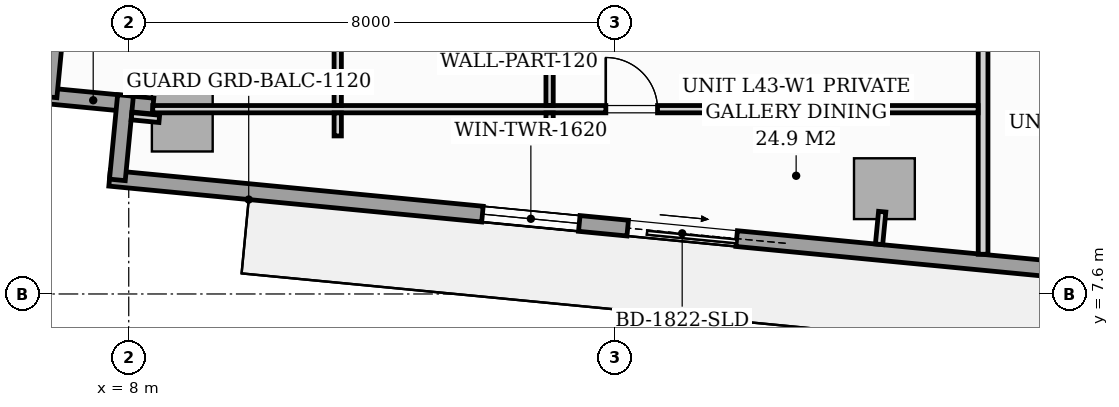
"""IFC4 building model, lengths in metres.
Left out: names, types, materials, properties, quantities, classifications, styles, units other than length and angle.
Written with IfcOpenShell. Run it as: python <this file> out.ifc"""

import sys

from ifc_helpers import new_model, si_unit, direction, frame, frame_2d, origin, origin_2d, place, context, subcontext, project, spatial, rectangle, extrude, source, transform, mapped, element, fill, save


model = new_model("IFC4")
c1 = context("Model", 3, precision=1e-05, world=origin(), true_north=direction((0.0, 1.0)))
c2 = subcontext(c1, "Body", "Model", "MODEL_VIEW")
j1 = project(units=[si_unit("LENGTHUNIT", "METRE"), si_unit("PLANEANGLEUNIT", "RADIAN")], contexts=[c1])
p1 = place(None, origin())
s1 = spatial("IfcSite", under=j1, at=p1, CompositionType="ELEMENT")
p2 = place(p1, origin())
s2 = spatial("IfcBuilding", under=s1, at=p2, CompositionType="ELEMENT")
p3 = place(p2, frame((0.0, 0.0, 150.2)))
s3 = spatial("IfcBuildingStorey", under=s2, at=p3, CompositionType="ELEMENT", Elevation=150.2)
m1 = source(origin(), c2, "Body", "SweptSolid", [
    extrude(rectangle(XDim=1.0, YDim=1.0, at=origin_2d()), origin(), (0.0, 0.0, 1.0), 3.196),
])
for number, where, z_axis, x_axis in (
    (1, (8.881, 10.443, 0.002), (0.0, 0.0, 1.0), (0.995, -0.096, 0.0)),
    (2, (20.427, 9.332, 0.002), (0.0, 0.0, 1.0), (0.995, -0.096, 0.0)),
):
    element("IfcColumn", number, at=place(p3, frame(where, z_axis=z_axis, x_axis=x_axis)), inside=s3, PredefinedType="COLUMN", context=c2, shape_type="MappedRepresentation", body=[
        mapped(m1, transform((0.0, 0.0, 0.0), scale=1.0)),
    ])
p4 = place(p3, frame((8.4, 10.69, 0.0), z_axis=(0.0, 0.0, 1.0), x_axis=(-0.995391147587, 0.095898192396, 0.0)))
e3 = element("IfcWall", 3, at=p4, inside=s3, PredefinedType="STANDARD", context=c2, shape_type="SweptSolid", body=[
    extrude(rectangle(XDim=1.978, YDim=0.26, at=frame_2d((0.989, 0.0))), origin(), (0.0, 0.0, 1.0), 2.94),
])
p5 = place(p3, frame((6.688, 10.84, 0.0), z_axis=(0.0, 0.0, 1.0), x_axis=(0.09589913835, 0.995391056452, 0.0)))
e4 = element("IfcWall", 4, at=p5, inside=s3, PredefinedType="STANDARD", context=c2, shape_type="SweptSolid", body=[
    extrude(rectangle(XDim=1.395, YDim=0.26, at=frame_2d((0.698, 0.0))), origin(), (0.0, 0.0, 1.0), 2.94),
])
p6 = place(p3, frame((24.617, 7.873, 0.0), z_axis=(0.0, 0.0, 1.0), x_axis=(-0.995395976631, 0.095848055311, 0.0)))
e5 = element("IfcWall", 5, at=p6, inside=s3, PredefinedType="STANDARD", context=c2, shape_type="SweptSolid", body=[
    extrude(rectangle(XDim=17.01, YDim=0.26, at=frame_2d((8.505, 0.0))), origin(), (0.0, 0.0, 1.0), 2.94),
])
p7 = place(p6, frame((6.65, 0.0, 0.0)))
e6 = element("IfcOpeningElement", 6, at=p7, cuts=e5, PredefinedType="OPENING", context=c2, shape_type="SweptSolid", body=[
    extrude(rectangle(XDim=1.8, YDim=2.06, at=frame_2d((0.9, 1.03))), frame((0.0, 0.14, 0.0), z_axis=(0.0, -1.0, 0.0), x_axis=(1.0, 0.0, 0.0)), (0.0, 0.0, 1.0), 0.28),
])
p8 = place(p6, frame((9.25, 0.0, 0.65)))
e7 = element("IfcOpeningElement", 7, at=p8, cuts=e5, PredefinedType="OPENING", context=c2, shape_type="SweptSolid", body=[
    extrude(rectangle(XDim=1.6, YDim=1.5, at=frame_2d((0.8, 0.75))), frame((0.0, 0.14, 0.0), z_axis=(0.0, -1.0, 0.0), x_axis=(1.0, 0.0, 0.0)), (0.0, 0.0, 1.0), 0.28),
])
p9 = place(p3, frame((7.813, 9.476, 0.0), z_axis=(0.0, 0.0, 1.0), x_axis=(0.095915846097, 0.995389446633, 0.0)))
e8 = element("IfcWall", 8, at=p9, inside=s3, PredefinedType="STANDARD", context=c2, shape_type="SweptSolid", body=[
    extrude(rectangle(XDim=1.395, YDim=0.26, at=frame_2d((0.697, 0.0))), origin(), (0.0, 0.0, 1.0), 2.94),
])
p10 = place(p3, frame((22.05, 8.253, 0.0), z_axis=(0.0, 0.0, 1.0), x_axis=(0.0, 1.0, 0.0)))
e9 = element("IfcWall", 9, at=p10, inside=s3, PredefinedType="PARTITIONING", context=c2, shape_type="SweptSolid", body=[
    extrude(rectangle(XDim=4.215, YDim=0.16, at=frame_2d((2.107, 0.0))), origin(), (0.0, 0.0, 1.0), 2.94),
])
p11 = place(p3, frame((8.395, 10.639, 0.0), z_axis=(0.0, 0.0, 1.0), x_axis=(1.0, 0.0, 0.0)))
e10 = element("IfcWall", 10, at=p11, inside=s3, PredefinedType="PARTITIONING", context=c2, shape_type="SweptSolid", body=[
    extrude(rectangle(XDim=13.573, YDim=0.12, at=frame_2d((6.787, 0.0))), origin(), (0.0, 0.0, 1.0), 2.94),
])
p12 = place(p11, frame((7.451, 0.0, 0.0)))
e11 = element("IfcOpeningElement", 11, at=p12, cuts=e10, PredefinedType="OPENING", context=c2, shape_type="SweptSolid", body=[
    extrude(rectangle(XDim=0.85, YDim=2.05, at=frame_2d((0.425, 1.025))), frame((0.0, 0.07, 0.0), z_axis=(0.0, -1.0, 0.0), x_axis=(1.0, 0.0, 0.0)), (0.0, 0.0, 1.0), 0.14),
])
p13 = place(p3, frame((11.437, 10.199, 0.0), z_axis=(0.0, 0.0, 1.0), x_axis=(0.0, 1.0, 0.0)))
e12 = element("IfcWall", 12, at=p13, inside=s3, PredefinedType="PARTITIONING", context=c2, shape_type="SweptSolid", body=[
    extrude(rectangle(XDim=0.378, YDim=0.12, at=frame_2d((0.189, 0.0))), origin(), (0.0, 0.0, 1.0), 2.94),
])
p14 = place(p3, frame((11.437, 10.701, 0.0), z_axis=(0.0, 0.0, 1.0), x_axis=(0.0, 1.0, 0.0)))
e13 = element("IfcWall", 13, at=p14, inside=s3, PredefinedType="PARTITIONING", context=c2, shape_type="SweptSolid", body=[
    extrude(rectangle(XDim=10.601, YDim=0.12, at=frame_2d((5.301, 0.0))), origin(), (0.0, 0.0, 1.0), 2.94),
])
p15 = place(p14, frame((4.876, 0.0, 0.0)))
e14 = element("IfcOpeningElement", 14, at=p15, cuts=e13, PredefinedType="OPENING", context=c2, shape_type="SweptSolid", body=[
    extrude(rectangle(XDim=0.85, YDim=2.05, at=frame_2d((0.425, 1.025))), frame((0.0, 0.07, 0.0), z_axis=(0.0, -1.0, 0.0), x_axis=(1.0, 0.0, 0.0)), (0.0, 0.0, 1.0), 0.14),
])
p16 = place(p3, frame((14.921, 10.199, 0.0), z_axis=(0.0, 0.0, 1.0), x_axis=(0.0, 1.0, 0.0)))
e15 = element("IfcWall", 15, at=p16, inside=s3, PredefinedType="PARTITIONING", context=c2, shape_type="SweptSolid", body=[
    extrude(rectangle(XDim=0.378, YDim=0.12, at=frame_2d((0.189, 0.0))), origin(), (0.0, 0.0, 1.0), 2.94),
])
p17 = place(p3, frame((14.921, 10.701, 0.0), z_axis=(0.0, 0.0, 1.0), x_axis=(0.0, 1.0, 0.0)))
e16 = element("IfcWall", 16, at=p17, inside=s3, PredefinedType="PARTITIONING", context=c2, shape_type="SweptSolid", body=[
    extrude(rectangle(XDim=10.601, YDim=0.12, at=frame_2d((5.301, 0.0))), origin(), (0.0, 0.0, 1.0), 2.94),
])
p18 = place(p17, frame((4.876, 0.0, 0.0)))
e17 = element("IfcOpeningElement", 17, at=p18, cuts=e16, PredefinedType="OPENING", context=c2, shape_type="SweptSolid", body=[
    extrude(rectangle(XDim=0.85, YDim=2.05, at=frame_2d((0.425, 1.025))), frame((0.0, 0.07, 0.0), z_axis=(0.0, -1.0, 0.0), x_axis=(1.0, 0.0, 0.0)), (0.0, 0.0, 1.0), 0.14),
])
p19 = place(p3, frame((8.502, 10.48, 0.0), z_axis=(0.0, 0.0, 1.0), x_axis=(-0.995384576284, 0.09596637586, 0.0)))
e18 = element("IfcWall", 18, at=p19, inside=s3, PredefinedType="PARTITIONING", context=c2, shape_type="SweptSolid", body=[
    extrude(rectangle(XDim=0.458, YDim=0.12, at=frame_2d((0.229, 0.0))), origin(), (0.0, 0.0, 1.0), 2.94),
])
p20 = place(p3, frame((20.391, 8.953, 0.0), z_axis=(0.0, 0.0, 1.0), x_axis=(-0.096222656154, -0.995359834654, 0.0)))
e19 = element("IfcWall", 19, at=p20, inside=s3, PredefinedType="PARTITIONING", context=c2, shape_type="SweptSolid", body=[
    extrude(rectangle(XDim=0.538, YDim=0.12, at=frame_2d((0.269, 0.0))), origin(), (0.0, 0.0, 1.0), 2.94),
])
m2 = source(origin(), c2, "Body", "SweptSolid", [
    extrude(rectangle(XDim=1.8, YDim=2.06, at=frame_2d((0.9, 1.03))), frame((0.0, 0.025, 0.0), z_axis=(0.0, -1.0, 0.0), x_axis=(1.0, 0.0, 0.0)), (0.0, 0.0, 1.0), 0.05),
])
p21 = place(p7, origin())
e20 = element("IfcDoor", 20, at=p21, inside=s3, OperationType="SLIDING_TO_LEFT", PredefinedType="DOOR", context=c2, shape_type="MappedRepresentation", body=[
    mapped(m2, transform((0.0, 0.0, 0.0), scale=1.0)),
])
fill(e6, e20)
m3 = source(origin(), c2, "Body", "SweptSolid", [
    extrude(rectangle(XDim=1.6, YDim=1.5, at=frame_2d((0.8, 0.75))), frame((0.0, 0.03, 0.0), z_axis=(0.0, -1.0, 0.0), x_axis=(1.0, 0.0, 0.0)), (0.0, 0.0, 1.0), 0.06),
])
p22 = place(p8, origin())
e21 = element("IfcWindow", 21, at=p22, inside=s3, PartitioningType="SINGLE_PANEL", PredefinedType="WINDOW", context=c2, shape_type="MappedRepresentation", body=[
    mapped(m3, transform((0.0, 0.0, 0.0), scale=1.0)),
])
fill(e7, e21)
m4 = source(origin(), c2, "Body", "SweptSolid", [
    extrude(rectangle(XDim=0.85, YDim=2.05, at=frame_2d((0.425, 1.025))), frame((0.0, 0.025, 0.0), z_axis=(0.0, -1.0, 0.0), x_axis=(1.0, 0.0, 0.0)), (0.0, 0.0, 1.0), 0.05),
])
p23 = place(p12, origin())
e22 = element("IfcDoor", 22, at=p23, inside=s3, OperationType="SINGLE_SWING_LEFT", PredefinedType="DOOR", context=c2, shape_type="MappedRepresentation", body=[
    mapped(m4, transform((0.0, 0.0, 0.0), scale=1.0)),
])
fill(e11, e22)
save(model, sys.argv[1])
